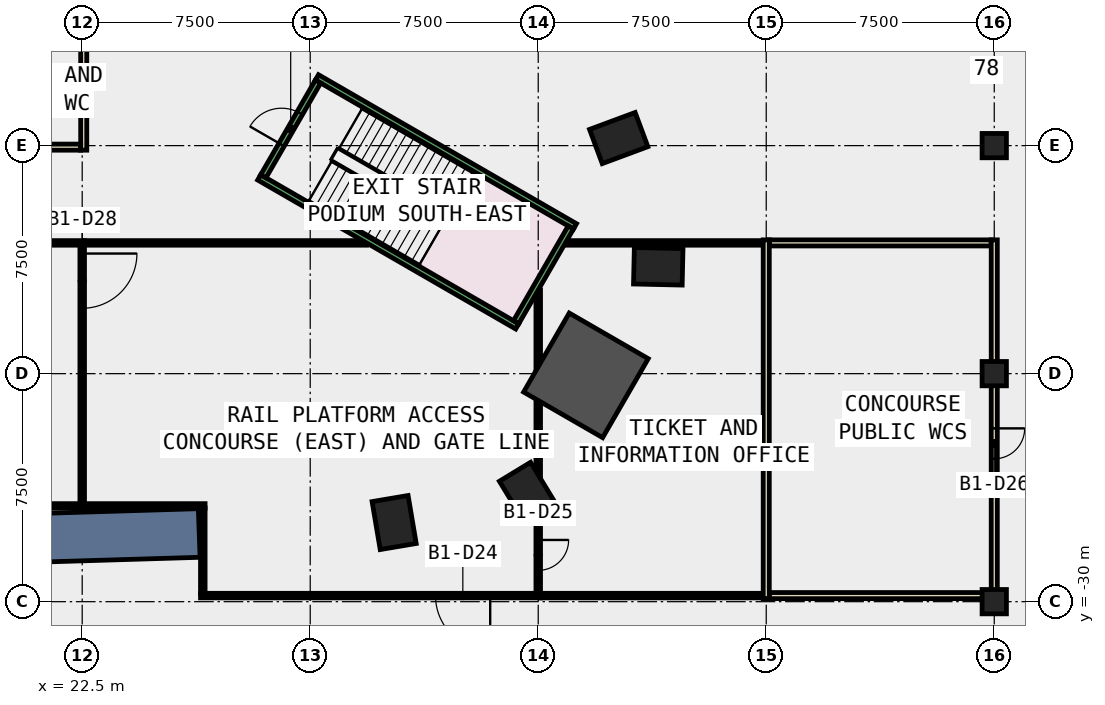
"""IFC4 building model, lengths in metres.
Left out: names, types, materials, properties, quantities, classifications, styles, units other than length and angle.
Written with IfcOpenShell. Run it as: python <this file> out.ifc"""

import sys

from ifc_helpers import new_model, si_unit, direction, frame, frame_2d, origin, origin_2d, place, context, subcontext, project, spatial, polyline, rectangle, outline, extrude, element, fill, save


model = new_model("IFC4")
c1 = context("Model", 3, precision=1e-05, world=origin(), true_north=direction((0.0, 1.0)))
c2 = subcontext(c1, "Body", "Model", "MODEL_VIEW")
j1 = project(units=[si_unit("LENGTHUNIT", "METRE"), si_unit("PLANEANGLEUNIT", "RADIAN")], contexts=[c1])
p1 = place(None, origin())
s1 = spatial("IfcSite", under=j1, at=p1, CompositionType="ELEMENT")
p2 = place(p1, origin())
s2 = spatial("IfcBuilding", under=s1, at=p2, CompositionType="ELEMENT")
p3 = place(p2, frame((0.0, 0.0, -5.5)))
s3 = spatial("IfcBuildingStorey", under=s2, at=p3, CompositionType="ELEMENT", Elevation=-5.5)
for number, where, z_axis, x_axis in (
    (1, (52.5, -30.0, -0.42), (0.0, 0.0, 1.0), (1.0, 0.0, 0.0)),
    (2, (52.5, -22.5, -0.42), (0.0, 0.0, 1.0), (1.0, 0.0, 0.0)),
    (3, (52.5, -15.0, -0.42), (0.0, 0.0, 1.0), (1.0, 0.0, 0.0)),
):
    element("IfcColumn", number, at=place(p3, frame(where, z_axis=z_axis, x_axis=x_axis)), inside=s3, PredefinedType="COLUMN", context=c2, shape_type="SweptSolid", body=[
        extrude(rectangle(XDim=0.8, YDim=0.8, at=origin_2d()), origin(), (0.0, 0.0, 1.0), 5.72),
    ])
for number, where, z_axis, x_axis in (
    (4, (32.761, -27.397, -0.42), (0.0, 0.0, 1.0), (0.986, 0.167, 0.0)),
    (5, (37.152, -26.411, -0.42), (0.0, 0.0, 1.0), (0.855, 0.519, 0.0)),
):
    element("IfcColumn", number, at=place(p3, frame(where, z_axis=z_axis, x_axis=x_axis)), inside=s3, PredefinedType="COLUMN", context=c2, shape_type="SweptSolid", body=[
        extrude(rectangle(XDim=1.2, YDim=1.6, at=origin_2d()), origin(), (0.0, 0.0, 1.0), 5.42),
    ])
p4 = place(p3, frame((39.069, -22.556, -0.42), z_axis=(0.0, 0.0, 1.0), x_axis=(-0.866025403784, 0.5, 0.0)))
e6 = element("IfcColumn", 6, at=p4, inside=s3, PredefinedType="COLUMN", context=c2, shape_type="SweptSolid", body=[
    extrude(rectangle(XDim=3.0, YDim=3.0, at=origin_2d()), origin(), (0.0, 0.0, 1.0), 5.42),
])
for number, where, z_axis, x_axis in (
    (7, (41.448, -18.969, -0.42), (0.0, 0.0, 1.0), (0.023, 1.0, 0.0)),
    (8, (40.147, -14.751, -0.42), (0.0, 0.0, 1.0), (-0.348, 0.937, 0.0)),
):
    element("IfcColumn", number, at=place(p3, frame(where, z_axis=z_axis, x_axis=x_axis)), inside=s3, PredefinedType="COLUMN", context=c2, shape_type="SweptSolid", body=[
        extrude(rectangle(XDim=1.2, YDim=1.6, at=origin_2d()), origin(), (0.0, 0.0, 1.0), 5.42),
    ])
p5 = place(p3, frame((0.0, 0.0, -0.42)))
e9 = element("IfcWall", 9, at=p5, inside=s3, PredefinedType="SHEAR", context=c2, shape_type="SweptSolid", body=[
    extrude(outline(polyline([(19.0, -28.762), (26.377, -28.54), (26.321, -26.941), (18.976, -27.162), (19.0, -28.762)])), origin(), (0.0, 0.0, 1.0), 5.42),
])
p6 = place(p3, frame((22.55, -10.619, 0.0), z_axis=(0.0, 0.0, 1.0), x_axis=(0.0, -1.0, 0.0)))
e10 = element("IfcWall", 10, at=p6, inside=s3, PredefinedType="PARTITIONING", context=c2, shape_type="SweptSolid", body=[
    extrude(rectangle(XDim=4.531, YDim=0.2, at=frame_2d((2.266, 0.0))), origin(), (0.0, 0.0, 1.0), 4.9),
])
p7 = place(p3, frame((22.45, -15.05, 0.0), z_axis=(0.0, 0.0, 1.0), x_axis=(-1.0, 0.0, 0.0)))
e11 = element("IfcWall", 11, at=p7, inside=s3, PredefinedType="PARTITIONING", context=c2, shape_type="SweptSolid", body=[
    extrude(rectangle(XDim=2.304, YDim=0.2, at=frame_2d((1.152, 0.0))), origin(), (0.0, 0.0, 1.0), 4.9),
])
p8 = place(p3, frame((22.425, -26.851, 0.0), z_axis=(0.0, 0.0, 1.0), x_axis=(-1.0, 0.0, 0.0)))
e12 = element("IfcWall", 12, at=p8, inside=s3, PredefinedType="PARTITIONING", context=c2, shape_type="SweptSolid", body=[
    extrude(rectangle(XDim=3.614, YDim=0.15, at=frame_2d((1.807, 0.0))), origin(), (0.0, 0.0, 1.0), 4.9),
])
p9 = place(p3, frame((-22.425, -18.2, 0.0), z_axis=(0.0, 0.0, 1.0), x_axis=(1.0, 0.0, 0.0)))
e13 = element("IfcWall", 13, at=p9, inside=s3, PredefinedType="PARTITIONING", context=c2, shape_type="SweptSolid", body=[
    extrude(rectangle(XDim=45.0, YDim=0.15, at=frame_2d((22.5, 0.0))), origin(), (0.0, 0.0, 1.0), 4.9),
])
p10 = place(p3, frame((37.575, -29.8, 0.0), z_axis=(0.0, 0.0, 1.0), x_axis=(-1.0, 0.0, 0.0)))
e14 = element("IfcWall", 14, at=p10, inside=s3, PredefinedType="PARTITIONING", context=c2, shape_type="SweptSolid", body=[
    extrude(rectangle(XDim=11.183, YDim=0.15, at=frame_2d((5.591, 0.0))), origin(), (0.0, 0.0, 1.0), 4.9),
])
p11 = place(p10, frame((1.655, 0.0, 0.0)))
e15 = element("IfcOpeningElement", 15, at=p11, cuts=e14, PredefinedType="OPENING", context=c2, shape_type="SweptSolid", body=[
    extrude(rectangle(XDim=1.8, YDim=2.1, at=frame_2d((0.9, 1.05))), frame((0.0, 0.085, 0.0), z_axis=(0.0, -1.0, 0.0), x_axis=(1.0, 0.0, 0.0)), (0.0, 0.0, 1.0), 0.17),
])
p12 = place(p3, frame((26.467, -29.725, 0.0), z_axis=(0.0, 0.0, 1.0), x_axis=(0.0, 1.0, 0.0)))
e16 = element("IfcWall", 16, at=p12, inside=s3, PredefinedType="PARTITIONING", context=c2, shape_type="SweptSolid", body=[
    extrude(rectangle(XDim=2.799, YDim=0.15, at=frame_2d((1.399, 0.0))), origin(), (0.0, 0.0, 1.0), 4.9),
])
p13 = place(p3, frame((26.542, -26.851, 0.0), z_axis=(0.0, 0.0, 1.0), x_axis=(-1.0, 0.0, 0.0)))
e17 = element("IfcWall", 17, at=p13, inside=s3, PredefinedType="PARTITIONING", context=c2, shape_type="SweptSolid", body=[
    extrude(rectangle(XDim=3.967, YDim=0.15, at=frame_2d((1.983, 0.0))), origin(), (0.0, 0.0, 1.0), 4.9),
])
p14 = place(p3, frame((22.575, -18.2, 0.0), z_axis=(0.0, 0.0, 1.0), x_axis=(1.0, 0.0, 0.0)))
e18 = element("IfcWall", 18, at=p14, inside=s3, PredefinedType="PARTITIONING", context=c2, shape_type="SweptSolid", body=[
    extrude(rectangle(XDim=9.278, YDim=0.15, at=frame_2d((4.639, 0.0))), origin(), (0.0, 0.0, 1.0), 4.9),
])
p15 = place(p3, frame((38.394, -18.2, 0.0), z_axis=(0.0, 0.0, 1.0), x_axis=(1.0, 0.0, 0.0)))
e19 = element("IfcWall", 19, at=p15, inside=s3, PredefinedType="PARTITIONING", context=c2, shape_type="SweptSolid", body=[
    extrude(rectangle(XDim=6.506, YDim=0.15, at=frame_2d((3.253, 0.0))), origin(), (0.0, 0.0, 1.0), 4.9),
])
p16 = place(p3, frame((44.9, -29.8, 0.0), z_axis=(0.0, 0.0, 1.0), x_axis=(-1.0, 0.0, 0.0)))
e20 = element("IfcWall", 20, at=p16, inside=s3, PredefinedType="PARTITIONING", context=c2, shape_type="SweptSolid", body=[
    extrude(rectangle(XDim=7.325, YDim=0.15, at=frame_2d((3.663, 0.0))), origin(), (0.0, 0.0, 1.0), 4.9),
])
p17 = place(p3, frame((45.1, -18.2, 0.0), z_axis=(0.0, 0.0, 1.0), x_axis=(1.0, 0.0, 0.0)))
e21 = element("IfcWall", 21, at=p17, inside=s3, PredefinedType="PARTITIONING", context=c2, shape_type="SweptSolid", body=[
    extrude(rectangle(XDim=7.3, YDim=0.2, at=frame_2d((3.65, 0.0))), origin(), (0.0, 0.0, 1.0), 4.9),
])
p18 = place(p3, frame((52.5, -18.1, 0.0), z_axis=(0.0, 0.0, 1.0), x_axis=(0.0, -1.0, 0.0)))
e22 = element("IfcWall", 22, at=p18, inside=s3, PredefinedType="PARTITIONING", context=c2, shape_type="SweptSolid", body=[
    extrude(rectangle(XDim=11.8, YDim=0.2, at=frame_2d((5.9, 0.0))), origin(), (0.0, 0.0, 1.0), 4.9),
])
p19 = place(p18, frame((6.2, 0.0, 0.0)))
e23 = element("IfcOpeningElement", 23, at=p19, cuts=e22, PredefinedType="OPENING", context=c2, shape_type="SweptSolid", body=[
    extrude(rectangle(XDim=1.0, YDim=2.1, at=frame_2d((0.5, 1.05))), frame((0.0, 0.11, 0.0), z_axis=(0.0, -1.0, 0.0), x_axis=(1.0, 0.0, 0.0)), (0.0, 0.0, 1.0), 0.22),
])
p20 = place(p3, frame((52.4, -29.8, 0.0), z_axis=(0.0, 0.0, 1.0), x_axis=(-1.0, 0.0, 0.0)))
e24 = element("IfcWall", 24, at=p20, inside=s3, PredefinedType="PARTITIONING", context=c2, shape_type="SweptSolid", body=[
    extrude(rectangle(XDim=7.3, YDim=0.2, at=frame_2d((3.65, 0.0))), origin(), (0.0, 0.0, 1.0), 4.9),
])
p21 = place(p3, frame((22.5, -18.275, 0.0), z_axis=(0.0, 0.0, 1.0), x_axis=(0.0, -1.0, 0.0)))
e25 = element("IfcWall", 25, at=p21, inside=s3, PredefinedType="PARTITIONING", context=c2, shape_type="SweptSolid", body=[
    extrude(rectangle(XDim=8.651, YDim=0.15, at=frame_2d((4.326, 0.0))), origin(), (0.0, 0.0, 1.0), 4.9),
])
p22 = place(p21, frame((0.275, 0.0, 0.0)))
e26 = element("IfcOpeningElement", 26, at=p22, cuts=e25, PredefinedType="OPENING", context=c2, shape_type="SweptSolid", body=[
    extrude(rectangle(XDim=1.8, YDim=2.1, at=frame_2d((0.9, 1.05))), frame((0.0, 0.085, 0.0), z_axis=(0.0, -1.0, 0.0), x_axis=(1.0, 0.0, 0.0)), (0.0, 0.0, 1.0), 0.17),
])
p23 = place(p3, frame((37.5, -19.748, 0.0), z_axis=(0.0, 0.0, 1.0), x_axis=(0.0, -1.0, 0.0)))
e27 = element("IfcWall", 27, at=p23, inside=s3, PredefinedType="PARTITIONING", context=c2, shape_type="SweptSolid", body=[
    extrude(rectangle(XDim=10.052, YDim=0.15, at=frame_2d((5.026, 0.0))), origin(), (0.0, 0.0, 1.0), 4.9),
])
p24 = place(p23, frame((8.222, 0.0, 0.0)))
e28 = element("IfcOpeningElement", 28, at=p24, cuts=e27, PredefinedType="OPENING", context=c2, shape_type="SweptSolid", body=[
    extrude(rectangle(XDim=1.0, YDim=2.1, at=frame_2d((0.5, 1.05))), frame((0.0, 0.085, 0.0), z_axis=(0.0, -1.0, 0.0), x_axis=(1.0, 0.0, 0.0)), (0.0, 0.0, 1.0), 0.17),
])
p25 = place(p3, frame((45.0, -18.1, 0.0), z_axis=(0.0, 0.0, 1.0), x_axis=(0.0, -1.0, 0.0)))
e29 = element("IfcWall", 29, at=p25, inside=s3, PredefinedType="PARTITIONING", context=c2, shape_type="SweptSolid", body=[
    extrude(rectangle(XDim=11.8, YDim=0.2, at=frame_2d((5.9, 0.0))), origin(), (0.0, 0.0, 1.0), 4.9),
])
for number, where, z_axis, x_axis in (
    (30, (28.322, -16.045, 0.0), (0.0, 0.0, 1.0), (0.866, -0.5, 0.0)),
    (31, (30.222, -12.755, 0.0), (0.0, 0.0, 1.0), (0.866, -0.5, 0.0)),
):
    element("IfcWall", number, at=place(p3, frame(where, z_axis=z_axis, x_axis=x_axis)), inside=s3, PredefinedType="STANDARD", context=c2, shape_type="SweptSolid", body=[
        extrude(rectangle(XDim=9.8, YDim=0.2, at=frame_2d((4.9, 0.0))), origin(), (0.0, 0.0, 1.0), 4.9),
    ])
p26 = place(p3, frame((28.458, -16.009, 0.0), z_axis=(0.0, 0.0, 1.0), x_axis=(0.499982693035, 0.866035395735, 0.0)))
e32 = element("IfcWall", 32, at=p26, inside=s3, PredefinedType="STANDARD", context=c2, shape_type="SweptSolid", body=[
    extrude(rectangle(XDim=3.6, YDim=0.2, at=frame_2d((1.8, 0.0))), origin(), (0.0, 0.0, 1.0), 4.9),
])
p27 = place(p26, frame((1.2, 0.0, 0.0)))
e33 = element("IfcOpeningElement", 33, at=p27, cuts=e32, PredefinedType="OPENING", context=c2, shape_type="SweptSolid", body=[
    extrude(rectangle(XDim=1.2, YDim=2.2, at=frame_2d((0.6, 1.1))), frame((0.0, 0.11, 0.0), z_axis=(0.0, -1.0, 0.0), x_axis=(1.0, 0.0, 0.0)), (0.0, 0.0, 1.0), 0.22),
])
p28 = place(p3, frame((36.772, -20.809, 0.0), z_axis=(0.0, 0.0, 1.0), x_axis=(0.49995333141, 0.866052346231, 0.0)))
e34 = element("IfcWall", 34, at=p28, inside=s3, PredefinedType="STANDARD", context=c2, shape_type="SweptSolid", body=[
    extrude(rectangle(XDim=3.6, YDim=0.2, at=frame_2d((1.8, 0.0))), origin(), (0.0, 0.0, 1.0), 4.9),
])
p29 = place(p11, origin())
e35 = element("IfcDoor", 35, at=p29, inside=s3, OperationType="DOUBLE_DOOR_SINGLE_SWING", PredefinedType="DOOR", context=c2, shape_type="SweptSolid", body=[
    extrude(rectangle(XDim=1.8, YDim=2.1, at=frame_2d((0.9, 1.05))), frame((0.0, 0.025, 0.0), z_axis=(0.0, -1.0, 0.0), x_axis=(1.0, 0.0, 0.0)), (0.0, 0.0, 1.0), 0.05),
])
fill(e15, e35)
p30 = place(p24, origin())
e36 = element("IfcDoor", 36, at=p30, inside=s3, OperationType="SINGLE_SWING_LEFT", PredefinedType="DOOR", context=c2, shape_type="SweptSolid", body=[
    extrude(rectangle(XDim=1.0, YDim=2.1, at=frame_2d((0.5, 1.05))), frame((0.0, 0.025, 0.0), z_axis=(0.0, -1.0, 0.0), x_axis=(1.0, 0.0, 0.0)), (0.0, 0.0, 1.0), 0.05),
])
fill(e28, e36)
p31 = place(p19, origin())
e37 = element("IfcDoor", 37, at=p31, inside=s3, OperationType="SINGLE_SWING_RIGHT", PredefinedType="DOOR", context=c2, shape_type="SweptSolid", body=[
    extrude(rectangle(XDim=1.0, YDim=2.1, at=frame_2d((0.5, 1.05))), frame((0.0, 0.025, 0.0), z_axis=(0.0, -1.0, 0.0), x_axis=(1.0, 0.0, 0.0)), (0.0, 0.0, 1.0), 0.05),
])
fill(e23, e37)
p32 = place(p22, origin())
e38 = element("IfcDoor", 38, at=p32, inside=s3, OperationType="DOUBLE_DOOR_SINGLE_SWING", PredefinedType="DOOR", context=c2, shape_type="SweptSolid", body=[
    extrude(rectangle(XDim=1.8, YDim=2.1, at=frame_2d((0.9, 1.05))), frame((0.0, 0.025, 0.0), z_axis=(0.0, -1.0, 0.0), x_axis=(1.0, 0.0, 0.0)), (0.0, 0.0, 1.0), 0.05),
])
fill(e26, e38)
p33 = place(p27, origin())
e39 = element("IfcDoor", 39, at=p33, inside=s3, OperationType="SINGLE_SWING_LEFT", PredefinedType="DOOR", context=c2, shape_type="SweptSolid", body=[
    extrude(rectangle(XDim=1.2, YDim=2.2, at=frame_2d((0.6, 1.1))), frame((0.0, 0.025, 0.0), z_axis=(0.0, -1.0, 0.0), x_axis=(1.0, 0.0, 0.0)), (0.0, 0.0, 1.0), 0.05),
])
fill(e33, e39)
save(model, sys.argv[1])
